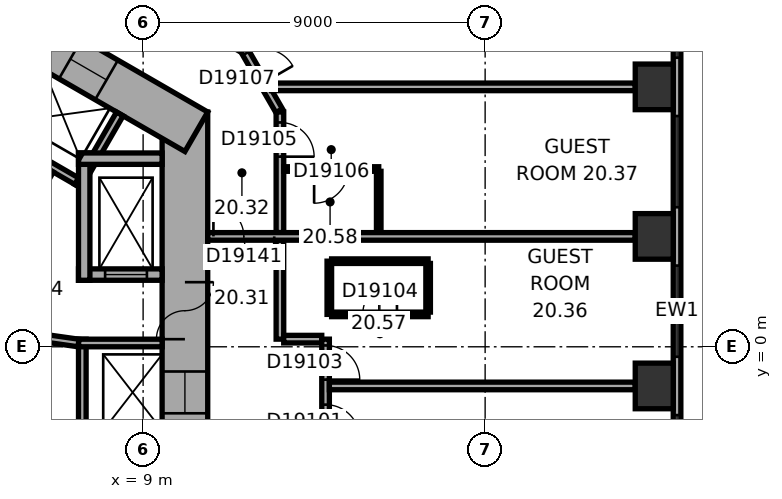
"""IFC4 building model, lengths in metres.
Left out: names, types, materials, properties, quantities, classifications, styles, units other than length and angle.
Written with IfcOpenShell. Run it as: python <this file> out.ifc"""

import sys

from ifc_helpers import new_model, si_unit, direction, frame, frame_2d, origin, origin_2d, place, context, subcontext, project, spatial, rectangle, extrude, element, fill, save


model = new_model("IFC4")
c1 = context("Model", 3, precision=1e-05, world=origin(), true_north=direction((0.0, 1.0)))
c2 = subcontext(c1, "Body", "Model", "MODEL_VIEW")
j1 = project(units=[si_unit("LENGTHUNIT", "METRE"), si_unit("PLANEANGLEUNIT", "RADIAN")], contexts=[c1])
p1 = place(None, origin())
s1 = spatial("IfcSite", under=j1, at=p1, CompositionType="ELEMENT")
p2 = place(p1, origin())
s2 = spatial("IfcBuilding", under=s1, at=p2, CompositionType="ELEMENT")
p3 = place(p2, frame((0.0, 0.0, 90.2)))
s3 = spatial("IfcBuildingStorey", under=s2, at=p3, CompositionType="ELEMENT", Elevation=90.2)
for number, where, z_axis, x_axis in (
    (1, (22.45, -1.03, 0.0), (0.0, 0.0, 1.0), (0.0, 1.0, 0.0)),
    (2, (22.45, 2.905, 0.0), (0.0, 0.0, 1.0), (0.0, 1.0, 0.0)),
    (3, (22.45, 6.839, 0.0), (0.0, 0.0, 1.0), (0.0, 1.0, 0.0)),
):
    element("IfcColumn", number, at=place(p3, frame(where, z_axis=z_axis, x_axis=x_axis)), inside=s3, PredefinedType="COLUMN", context=c2, shape_type="SweptSolid", body=[
        extrude(rectangle(XDim=1.2, YDim=1.0, at=origin_2d()), origin(), (0.0, 0.0, 1.0), 3.3),
    ])
p4 = place(p3, frame((10.1, -6.177, 0.0), z_axis=(0.0, 0.0, 1.0), x_axis=(0.0, 1.0, 0.0)))
e4 = element("IfcWall", 4, at=p4, inside=s3, PredefinedType="SHEAR", context=c2, shape_type="SweptSolid", body=[
    extrude(rectangle(XDim=12.355, YDim=1.2, at=frame_2d((6.177, 0.0))), origin(), (0.0, 0.0, 1.0), 3.3),
])
p5 = place(p4, frame((6.378, 0.0, 0.0)))
e5 = element("IfcOpeningElement", 5, at=p5, cuts=e4, PredefinedType="OPENING", context=c2, shape_type="SweptSolid", body=[
    extrude(rectangle(XDim=1.5, YDim=2.1, at=frame_2d((0.75, 1.05))), frame((0.0, 0.61, 0.0), z_axis=(0.0, -1.0, 0.0), x_axis=(1.0, 0.0, 0.0)), (0.0, 0.0, 1.0), 1.22),
])
p6 = place(p4, frame((1.828, 0.0, 0.0)))
e6 = element("IfcOpeningElement", 6, at=p6, cuts=e4, PredefinedType="OPENING", context=c2, shape_type="SweptSolid", body=[
    extrude(rectangle(XDim=1.1, YDim=2.1, at=frame_2d((0.55, 1.05))), frame((0.0, 0.61, 0.0), z_axis=(0.0, -1.0, 0.0), x_axis=(1.0, 0.0, 0.0)), (0.0, 0.0, 1.0), 1.22),
])
p7 = place(p4, frame((4.427, 0.0, 0.0)))
e7 = element("IfcOpeningElement", 7, at=p7, cuts=e4, PredefinedType="OPENING", context=c2, shape_type="SweptSolid", body=[
    extrude(rectangle(XDim=1.1, YDim=2.1, at=frame_2d((0.55, 1.05))), frame((0.0, 0.61, 0.0), z_axis=(0.0, -1.0, 0.0), x_axis=(1.0, 0.0, 0.0)), (0.0, 0.0, 1.0), 1.22),
])
p8 = place(p3, frame((10.4, 5.658, 0.0), z_axis=(0.0, 0.0, 1.0), x_axis=(-0.866021384402, 0.500006961711, 0.0)))
e8 = element("IfcWall", 8, at=p8, inside=s3, PredefinedType="SHEAR", context=c2, shape_type="SweptSolid", body=[
    extrude(rectangle(XDim=12.355, YDim=1.2, at=frame_2d((6.178, 0.0))), origin(), (0.0, 0.0, 1.0), 3.3),
])
p9 = place(p8, frame((2.728, 0.0, 0.0)))
e9 = element("IfcOpeningElement", 9, at=p9, cuts=e8, PredefinedType="OPENING", context=c2, shape_type="SweptSolid", body=[
    extrude(rectangle(XDim=1.1, YDim=2.1, at=frame_2d((0.55, 1.05))), frame((0.0, 0.61, 0.0), z_axis=(0.0, -1.0, 0.0), x_axis=(1.0, 0.0, 0.0)), (0.0, 0.0, 1.0), 1.22),
])
p10 = place(p8, frame((5.328, 0.0, 0.0)))
e10 = element("IfcOpeningElement", 10, at=p10, cuts=e8, PredefinedType="OPENING", context=c2, shape_type="SweptSolid", body=[
    extrude(rectangle(XDim=1.1, YDim=2.1, at=frame_2d((0.55, 1.05))), frame((0.0, 0.61, 0.0), z_axis=(0.0, -1.0, 0.0), x_axis=(1.0, 0.0, 0.0)), (0.0, 0.0, 1.0), 1.22),
])
p11 = place(p8, frame((7.928, 0.0, 0.0)))
e11 = element("IfcOpeningElement", 11, at=p11, cuts=e8, PredefinedType="OPENING", context=c2, shape_type="SweptSolid", body=[
    extrude(rectangle(XDim=1.1, YDim=2.1, at=frame_2d((0.55, 1.05))), frame((0.0, 0.61, 0.0), z_axis=(0.0, -1.0, 0.0), x_axis=(1.0, 0.0, 0.0)), (0.0, 0.0, 1.0), 1.22),
])
p12 = place(p3, frame((23.05, -9.687, 0.0), z_axis=(0.0, 0.0, 1.0), x_axis=(0.0, 1.0, 0.0)))
e12 = element("IfcWall", 12, at=p12, inside=s3, PredefinedType="STANDARD", context=c2, shape_type="SweptSolid", body=[
    extrude(rectangle(XDim=21.246, YDim=0.2, at=frame_2d((10.623, 0.0))), origin(), (0.0, 0.0, 1.0), 3.3),
])
p13 = place(p12, frame((1.555, 0.0, 0.8)))
e13 = element("IfcOpeningElement", 13, at=p13, cuts=e12, PredefinedType="OPENING", context=c2, shape_type="SweptSolid", body=[
    extrude(rectangle(XDim=2.4, YDim=1.7, at=frame_2d((1.2, 0.85))), frame((0.0, 0.11, 0.0), z_axis=(0.0, -1.0, 0.0), x_axis=(1.0, 0.0, 0.0)), (0.0, 0.0, 1.0), 0.22),
])
p14 = place(p12, frame((5.489, 0.0, 0.8)))
e14 = element("IfcOpeningElement", 14, at=p14, cuts=e12, PredefinedType="OPENING", context=c2, shape_type="SweptSolid", body=[
    extrude(rectangle(XDim=2.4, YDim=1.7, at=frame_2d((1.2, 0.85))), frame((0.0, 0.11, 0.0), z_axis=(0.0, -1.0, 0.0), x_axis=(1.0, 0.0, 0.0)), (0.0, 0.0, 1.0), 0.22),
])
p15 = place(p12, frame((9.424, 0.0, 0.8)))
e15 = element("IfcOpeningElement", 15, at=p15, cuts=e12, PredefinedType="OPENING", context=c2, shape_type="SweptSolid", body=[
    extrude(rectangle(XDim=2.4, YDim=1.7, at=frame_2d((1.2, 0.85))), frame((0.0, 0.11, 0.0), z_axis=(0.0, -1.0, 0.0), x_axis=(1.0, 0.0, 0.0)), (0.0, 0.0, 1.0), 0.22),
])
p16 = place(p12, frame((13.358, 0.0, 0.8)))
e16 = element("IfcOpeningElement", 16, at=p16, cuts=e12, PredefinedType="OPENING", context=c2, shape_type="SweptSolid", body=[
    extrude(rectangle(XDim=2.4, YDim=1.7, at=frame_2d((1.2, 0.85))), frame((0.0, 0.11, 0.0), z_axis=(0.0, -1.0, 0.0), x_axis=(1.0, 0.0, 0.0)), (0.0, 0.0, 1.0), 0.22),
])
p17 = place(p12, frame((17.293, 0.0, 0.8)))
e17 = element("IfcOpeningElement", 17, at=p17, cuts=e12, PredefinedType="OPENING", context=c2, shape_type="SweptSolid", body=[
    extrude(rectangle(XDim=2.4, YDim=1.7, at=frame_2d((1.2, 0.85))), frame((0.0, 0.11, 0.0), z_axis=(0.0, -1.0, 0.0), x_axis=(1.0, 0.0, 0.0)), (0.0, 0.0, 1.0), 0.22),
])
p18 = place(p3, frame((7.4, -5.2, 0.0), z_axis=(0.0, 0.0, 1.0), x_axis=(0.0, 1.0, 0.0)))
e18 = element("IfcWall", 18, at=p18, inside=s3, PredefinedType="PARTITIONING", context=c2, shape_type="SweptSolid", body=[
    extrude(rectangle(XDim=5.4, YDim=0.2, at=frame_2d((2.7, 0.0))), origin(), (0.0, 0.0, 1.0), 3.05),
])
p19 = place(p3, frame((7.3, 0.1, 0.0), z_axis=(0.0, 0.0, 1.0), x_axis=(1.0, 0.0, 0.0)))
e19 = element("IfcWall", 19, at=p19, inside=s3, PredefinedType="PARTITIONING", context=c2, shape_type="SweptSolid", body=[
    extrude(rectangle(XDim=2.2, YDim=0.2, at=frame_2d((1.1, 0.0))), origin(), (0.0, 0.0, 1.0), 3.05),
])
p20 = place(p3, frame((7.424, 4.259, 0.0), z_axis=(0.0, 0.0, 1.0), x_axis=(-0.866026010844, 0.49999894854, 0.0)))
e20 = element("IfcWall", 20, at=p20, inside=s3, PredefinedType="PARTITIONING", context=c2, shape_type="SweptSolid", body=[
    extrude(rectangle(XDim=8.0, YDim=0.2, at=frame_2d((4.0, 0.0))), origin(), (0.0, 0.0, 1.0), 3.05),
])
p21 = place(p3, frame((7.287, 4.222, 0.0), z_axis=(0.0, 0.0, 1.0), x_axis=(0.499946605688, 0.86605622881, 0.0)))
e21 = element("IfcWall", 21, at=p21, inside=s3, PredefinedType="PARTITIONING", context=c2, shape_type="SweptSolid", body=[
    extrude(rectangle(XDim=2.2, YDim=0.2, at=frame_2d((1.1, 0.0))), origin(), (0.0, 0.0, 1.0), 3.05),
])
p22 = place(p3, frame((4.158, 0.602, 0.0), z_axis=(0.0, 0.0, 1.0), x_axis=(0.499977259774, 0.866038532462, 0.0)))
e22 = element("IfcWall", 22, at=p22, inside=s3, PredefinedType="SHEAR", context=c2, shape_type="SweptSolid", body=[
    extrude(rectangle(XDim=4.7, YDim=0.3, at=frame_2d((2.35, 0.0))), origin(), (0.0, 0.0, 1.0), 3.05),
])
p23 = place(p22, frame((0.8, 0.0, 0.0)))
e23 = element("IfcOpeningElement", 23, at=p23, cuts=e22, PredefinedType="OPENING", context=c2, shape_type="SweptSolid", body=[
    extrude(rectangle(XDim=1.2, YDim=2.1, at=frame_2d((0.6, 1.05))), frame((0.0, 0.16, 0.0), z_axis=(0.0, -1.0, 0.0), x_axis=(1.0, 0.0, 0.0)), (0.0, 0.0, 1.0), 0.32),
])
p24 = place(p3, frame((4.816, -0.222, 0.0), z_axis=(0.0, 0.0, 1.0), x_axis=(0.499977259774, -0.866038532462, 0.0)))
e24 = element("IfcWall", 24, at=p24, inside=s3, PredefinedType="SHEAR", context=c2, shape_type="SweptSolid", body=[
    extrude(rectangle(XDim=4.7, YDim=0.3, at=frame_2d((2.35, 0.0))), origin(), (0.0, 0.0, 1.0), 3.05),
])
p25 = place(p3, frame((7.3, 1.9, 0.0), z_axis=(0.0, 0.0, 1.0), x_axis=(1.0, 0.0, 0.0)))
e25 = element("IfcWall", 25, at=p25, inside=s3, PredefinedType="SHEAR", context=c2, shape_type="SweptSolid", body=[
    extrude(rectangle(XDim=2.2, YDim=0.3, at=frame_2d((1.1, 0.0))), origin(), (0.0, 0.0, 1.0), 3.05),
])
p26 = place(p25, frame((0.7, 0.0, 0.0)))
e26 = element("IfcOpeningElement", 26, at=p26, cuts=e25, PredefinedType="OPENING", context=c2, shape_type="SweptSolid", body=[
    extrude(rectangle(XDim=1.1, YDim=2.1, at=frame_2d((0.55, 1.05))), frame((0.0, 0.16, 0.0), z_axis=(0.0, -1.0, 0.0), x_axis=(1.0, 0.0, 0.0)), (0.0, 0.0, 1.0), 0.32),
])
p27 = place(p3, frame((7.45, 1.75, 0.0), z_axis=(0.0, 0.0, 1.0), x_axis=(0.0, 1.0, 0.0)))
e27 = element("IfcWall", 27, at=p27, inside=s3, PredefinedType="SHEAR", context=c2, shape_type="SweptSolid", body=[
    extrude(rectangle(XDim=3.35, YDim=0.3, at=frame_2d((1.675, 0.0))), origin(), (0.0, 0.0, 1.0), 3.05),
])
p28 = place(p3, frame((7.3, 4.95, 0.0), z_axis=(0.0, 0.0, 1.0), x_axis=(1.0, 0.0, 0.0)))
e28 = element("IfcWall", 28, at=p28, inside=s3, PredefinedType="SHEAR", context=c2, shape_type="SweptSolid", body=[
    extrude(rectangle(XDim=2.2, YDim=0.3, at=frame_2d((1.1, 0.0))), origin(), (0.0, 0.0, 1.0), 3.05),
])
p29 = place(p3, frame((4.327, 0.521, 0.0), z_axis=(0.0, 0.0, 1.0), x_axis=(0.990124376366, -0.14019172346, 0.0)))
e29 = element("IfcWall", 29, at=p29, inside=s3, PredefinedType="PARTITIONING", context=c2, shape_type="SweptSolid", body=[
    extrude(rectangle(XDim=3.002, YDim=0.2, at=frame_2d((1.501, 0.0))), origin(), (0.0, 0.0, 1.0), 3.05),
])
p30 = place(p29, frame((1.15, 0.0, 0.0)))
e30 = element("IfcOpeningElement", 30, at=p30, cuts=e29, PredefinedType="OPENING", context=c2, shape_type="SweptSolid", body=[
    extrude(rectangle(XDim=0.9, YDim=2.1, at=frame_2d((0.45, 1.05))), frame((0.0, 0.11, 0.0), z_axis=(0.0, -1.0, 0.0), x_axis=(1.0, 0.0, 0.0)), (0.0, 0.0, 1.0), 0.22),
])
p31 = place(p3, frame((12.58, 6.212, 0.0), z_axis=(0.0, 0.0, 1.0), x_axis=(-0.500063286585, 0.865988862174, 0.0)))
e31 = element("IfcWall", 31, at=p31, inside=s3, PredefinedType="PARTITIONING", context=c2, shape_type="SweptSolid", body=[
    extrude(rectangle(XDim=1.86, YDim=0.2, at=frame_2d((0.93, 0.0))), origin(), (0.0, 0.0, 1.0), 3.05),
])
p32 = place(p31, frame((0.842, 0.0, 0.0)))
e32 = element("IfcOpeningElement", 32, at=p32, cuts=e31, PredefinedType="OPENING", context=c2, shape_type="SweptSolid", body=[
    extrude(rectangle(XDim=0.9, YDim=2.1, at=frame_2d((0.45, 1.05))), frame((0.0, 0.11, 0.0), z_axis=(0.0, -1.0, 0.0), x_axis=(1.0, 0.0, 0.0)), (0.0, 0.0, 1.0), 0.22),
])
p33 = place(p3, frame((12.6, 0.201, 0.0), z_axis=(0.0, 0.0, 1.0), x_axis=(0.0, 1.0, 0.0)))
e33 = element("IfcWall", 33, at=p33, inside=s3, PredefinedType="PARTITIONING", context=c2, shape_type="SweptSolid", body=[
    extrude(rectangle(XDim=2.604, YDim=0.2, at=frame_2d((1.302, 0.0))), origin(), (0.0, 0.0, 1.0), 3.05),
])
p34 = place(p3, frame((12.6, 3.004, 0.0), z_axis=(0.0, 0.0, 1.0), x_axis=(0.0, 1.0, 0.0)))
e34 = element("IfcWall", 34, at=p34, inside=s3, PredefinedType="PARTITIONING", context=c2, shape_type="SweptSolid", body=[
    extrude(rectangle(XDim=3.173, YDim=0.2, at=frame_2d((1.586, 0.0))), origin(), (0.0, 0.0, 1.0), 3.05),
])
p35 = place(p34, frame((1.998, 0.0, 0.0)))
e35 = element("IfcOpeningElement", 35, at=p35, cuts=e34, PredefinedType="OPENING", context=c2, shape_type="SweptSolid", body=[
    extrude(rectangle(XDim=0.9, YDim=2.1, at=frame_2d((0.45, 1.05))), frame((0.0, 0.11, 0.0), z_axis=(0.0, -1.0, 0.0), x_axis=(1.0, 0.0, 0.0)), (0.0, 0.0, 1.0), 0.22),
])
p36 = place(p3, frame((12.7, 4.677, 0.0), z_axis=(0.0, 0.0, 1.0), x_axis=(1.0, 0.0, 0.0)))
e36 = element("IfcWall", 36, at=p36, inside=s3, PredefinedType="PARTITIONING", context=c2, shape_type="SweptSolid", body=[
    extrude(rectangle(XDim=2.5, YDim=0.12, at=frame_2d((1.25, 0.0))), origin(), (0.0, 0.0, 1.0), 3.05),
])
p37 = place(p36, frame((0.8, 0.0, 0.0)))
e37 = element("IfcOpeningElement", 37, at=p37, cuts=e36, PredefinedType="OPENING", context=c2, shape_type="SweptSolid", body=[
    extrude(rectangle(XDim=0.9, YDim=2.1, at=frame_2d((0.45, 1.05))), frame((0.0, 0.07, 0.0), z_axis=(0.0, -1.0, 0.0), x_axis=(1.0, 0.0, 0.0)), (0.0, 0.0, 1.0), 0.14),
])
p38 = place(p3, frame((13.701, 0.201, 0.0), z_axis=(0.0, 0.0, 1.0), x_axis=(-1.0, 0.0, 0.0)))
e38 = element("IfcWall", 38, at=p38, inside=s3, PredefinedType="PARTITIONING", context=c2, shape_type="SweptSolid", body=[
    extrude(rectangle(XDim=1.001, YDim=0.2, at=frame_2d((0.5, 0.0))), origin(), (0.0, 0.0, 1.0), 3.05),
])
p39 = place(p3, frame((13.801, -5.501, 0.0), z_axis=(0.0, 0.0, 1.0), x_axis=(0.0, 1.0, 0.0)))
e39 = element("IfcWall", 39, at=p39, inside=s3, PredefinedType="PARTITIONING", context=c2, shape_type="SweptSolid", body=[
    extrude(rectangle(XDim=5.702, YDim=0.2, at=frame_2d((2.851, 0.0))), origin(), (0.0, 0.0, 1.0), 3.05),
])
p40 = place(p39, frame((3.079, 0.0, 0.0)))
e40 = element("IfcOpeningElement", 40, at=p40, cuts=e39, PredefinedType="OPENING", context=c2, shape_type="SweptSolid", body=[
    extrude(rectangle(XDim=0.9, YDim=2.1, at=frame_2d((0.45, 1.05))), frame((0.0, 0.11, 0.0), z_axis=(0.0, -1.0, 0.0), x_axis=(1.0, 0.0, 0.0)), (0.0, 0.0, 1.0), 0.22),
])
p41 = place(p39, frame((4.636, 0.0, 0.0)))
e41 = element("IfcOpeningElement", 41, at=p41, cuts=e39, PredefinedType="OPENING", context=c2, shape_type="SweptSolid", body=[
    extrude(rectangle(XDim=0.9, YDim=2.1, at=frame_2d((0.45, 1.05))), frame((0.0, 0.11, 0.0), z_axis=(0.0, -1.0, 0.0), x_axis=(1.0, 0.0, 0.0)), (0.0, 0.0, 1.0), 0.22),
])
p42 = place(p3, frame((13.9, 0.853, 0.0), z_axis=(0.0, 0.0, 1.0), x_axis=(0.0, 1.0, 0.0)))
e42 = element("IfcWall", 42, at=p42, inside=s3, PredefinedType="PARTITIONING", context=c2, shape_type="SweptSolid", body=[
    extrude(rectangle(XDim=1.4, YDim=0.12, at=frame_2d((0.7, 0.0))), origin(), (0.0, 0.0, 1.0), 3.05),
])
p43 = place(p3, frame((13.96, 2.253, 0.0), z_axis=(0.0, 0.0, 1.0), x_axis=(1.0, 0.0, 0.0)))
e43 = element("IfcWall", 43, at=p43, inside=s3, PredefinedType="PARTITIONING", context=c2, shape_type="SweptSolid", body=[
    extrude(rectangle(XDim=2.54, YDim=0.12, at=frame_2d((1.27, 0.0))), origin(), (0.0, 0.0, 1.0), 3.05),
])
p44 = place(p3, frame((15.2, 4.618, 0.0), z_axis=(0.0, 0.0, 1.0), x_axis=(0.0, -1.0, 0.0)))
e44 = element("IfcWall", 44, at=p44, inside=s3, PredefinedType="PARTITIONING", context=c2, shape_type="SweptSolid", body=[
    extrude(rectangle(XDim=1.613, YDim=0.12, at=frame_2d((0.807, 0.0))), origin(), (0.0, 0.0, 1.0), 3.05),
])
p45 = place(p3, frame((16.5, 0.853, 0.0), z_axis=(0.0, 0.0, 1.0), x_axis=(-1.0, 0.0, 0.0)))
e45 = element("IfcWall", 45, at=p45, inside=s3, PredefinedType="PARTITIONING", context=c2, shape_type="SweptSolid", body=[
    extrude(rectangle(XDim=2.54, YDim=0.12, at=frame_2d((1.27, 0.0))), origin(), (0.0, 0.0, 1.0), 3.05),
])
p46 = place(p45, frame((0.82, 0.0, 0.0)))
e46 = element("IfcOpeningElement", 46, at=p46, cuts=e45, PredefinedType="OPENING", context=c2, shape_type="SweptSolid", body=[
    extrude(rectangle(XDim=0.9, YDim=2.1, at=frame_2d((0.45, 1.05))), frame((0.0, 0.07, 0.0), z_axis=(0.0, -1.0, 0.0), x_axis=(1.0, 0.0, 0.0)), (0.0, 0.0, 1.0), 0.14),
])
p47 = place(p3, frame((16.5, 2.193, 0.0), z_axis=(0.0, 0.0, 1.0), x_axis=(0.0, -1.0, 0.0)))
e47 = element("IfcWall", 47, at=p47, inside=s3, PredefinedType="PARTITIONING", context=c2, shape_type="SweptSolid", body=[
    extrude(rectangle(XDim=1.28, YDim=0.12, at=frame_2d((0.64, 0.0))), origin(), (0.0, 0.0, 1.0), 3.05),
])
p48 = place(p3, frame((21.95, -1.03, 0.0), z_axis=(0.0, 0.0, 1.0), x_axis=(-1.0, 0.0, 0.0)))
e48 = element("IfcWall", 48, at=p48, inside=s3, PredefinedType="PARTITIONING", context=c2, shape_type="SweptSolid", body=[
    extrude(rectangle(XDim=8.049, YDim=0.2, at=frame_2d((4.024, 0.0))), origin(), (0.0, 0.0, 1.0), 2.6),
])
p49 = place(p3, frame((21.95, 2.905, 0.0), z_axis=(0.0, 0.0, 1.0), x_axis=(-1.0, 0.0, 0.0)))
e49 = element("IfcWall", 49, at=p49, inside=s3, PredefinedType="PARTITIONING", context=c2, shape_type="SweptSolid", body=[
    extrude(rectangle(XDim=11.25, YDim=0.2, at=frame_2d((5.625, 0.0))), origin(), (0.0, 0.0, 1.0), 3.05),
])
p50 = place(p49, frame((9.5, 0.0, 0.0)))
e50 = element("IfcOpeningElement", 50, at=p50, cuts=e49, PredefinedType="OPENING", context=c2, shape_type="SweptSolid", body=[
    extrude(rectangle(XDim=1.6, YDim=2.1, at=frame_2d((0.8, 1.05))), frame((0.0, 0.11, 0.0), z_axis=(0.0, -1.0, 0.0), x_axis=(1.0, 0.0, 0.0)), (0.0, 0.0, 1.0), 0.22),
])
p51 = place(p3, frame((21.95, 6.839, 0.0), z_axis=(0.0, 0.0, 1.0), x_axis=(-1.0, 0.0, 0.0)))
e51 = element("IfcWall", 51, at=p51, inside=s3, PredefinedType="PARTITIONING", context=c2, shape_type="SweptSolid", body=[
    extrude(rectangle(XDim=9.572, YDim=0.2, at=frame_2d((4.786, 0.0))), origin(), (0.0, 0.0, 1.0), 3.05),
])
p52 = place(p14, origin())
e52 = element("IfcWindow", 52, at=p52, inside=s3, PartitioningType="SINGLE_PANEL", PredefinedType="WINDOW", context=c2, shape_type="SweptSolid", body=[
    extrude(rectangle(XDim=2.4, YDim=1.7, at=frame_2d((1.2, 0.85))), frame((0.0, 0.03, 0.0), z_axis=(0.0, -1.0, 0.0), x_axis=(1.0, 0.0, 0.0)), (0.0, 0.0, 1.0), 0.06),
])
fill(e14, e52)
p53 = place(p15, origin())
e53 = element("IfcWindow", 53, at=p53, inside=s3, PartitioningType="SINGLE_PANEL", PredefinedType="WINDOW", context=c2, shape_type="SweptSolid", body=[
    extrude(rectangle(XDim=2.4, YDim=1.7, at=frame_2d((1.2, 0.85))), frame((0.0, 0.03, 0.0), z_axis=(0.0, -1.0, 0.0), x_axis=(1.0, 0.0, 0.0)), (0.0, 0.0, 1.0), 0.06),
])
fill(e15, e53)
p54 = place(p16, origin())
e54 = element("IfcWindow", 54, at=p54, inside=s3, PartitioningType="SINGLE_PANEL", PredefinedType="WINDOW", context=c2, shape_type="SweptSolid", body=[
    extrude(rectangle(XDim=2.4, YDim=1.7, at=frame_2d((1.2, 0.85))), frame((0.0, 0.03, 0.0), z_axis=(0.0, -1.0, 0.0), x_axis=(1.0, 0.0, 0.0)), (0.0, 0.0, 1.0), 0.06),
])
fill(e16, e54)
p55 = place(p17, origin())
e55 = element("IfcWindow", 55, at=p55, inside=s3, PartitioningType="SINGLE_PANEL", PredefinedType="WINDOW", context=c2, shape_type="SweptSolid", body=[
    extrude(rectangle(XDim=2.4, YDim=1.7, at=frame_2d((1.2, 0.85))), frame((0.0, 0.03, 0.0), z_axis=(0.0, -1.0, 0.0), x_axis=(1.0, 0.0, 0.0)), (0.0, 0.0, 1.0), 0.06),
])
fill(e17, e55)
p56 = place(p5, origin())
e56 = element("IfcDoor", 56, at=p56, inside=s3, OperationType="DOUBLE_DOOR_SINGLE_SWING", PredefinedType="DOOR", context=c2, shape_type="SweptSolid", body=[
    extrude(rectangle(XDim=1.5, YDim=2.1, at=frame_2d((0.75, 1.05))), frame((0.0, 0.025, 0.0), z_axis=(0.0, -1.0, 0.0), x_axis=(1.0, 0.0, 0.0)), (0.0, 0.0, 1.0), 0.05),
])
fill(e5, e56)
p57 = place(p26, origin())
e57 = element("IfcDoor", 57, at=p57, inside=s3, OperationType="DOUBLE_DOOR_SLIDING", PredefinedType="DOOR", context=c2, shape_type="SweptSolid", body=[
    extrude(rectangle(XDim=1.1, YDim=2.1, at=frame_2d((0.55, 1.05))), frame((0.0, 0.025, 0.0), z_axis=(0.0, -1.0, 0.0), x_axis=(1.0, 0.0, 0.0)), (0.0, 0.0, 1.0), 0.05),
])
fill(e26, e57)
p58 = place(p7, origin())
e58 = element("IfcDoor", 58, at=p58, inside=s3, OperationType="DOUBLE_DOOR_SLIDING", PredefinedType="DOOR", context=c2, shape_type="SweptSolid", body=[
    extrude(rectangle(XDim=1.1, YDim=2.1, at=frame_2d((0.55, 1.05))), frame((0.0, 0.025, 0.0), z_axis=(0.0, -1.0, 0.0), x_axis=(1.0, 0.0, 0.0)), (0.0, 0.0, 1.0), 0.05),
])
fill(e7, e58)
p59 = place(p9, origin())
e59 = element("IfcDoor", 59, at=p59, inside=s3, OperationType="DOUBLE_DOOR_SLIDING", PredefinedType="DOOR", context=c2, shape_type="SweptSolid", body=[
    extrude(rectangle(XDim=1.1, YDim=2.1, at=frame_2d((0.55, 1.05))), frame((0.0, 0.025, 0.0), z_axis=(0.0, -1.0, 0.0), x_axis=(1.0, 0.0, 0.0)), (0.0, 0.0, 1.0), 0.05),
])
fill(e9, e59)
p60 = place(p40, origin())
e60 = element("IfcDoor", 60, at=p60, inside=s3, OperationType="SINGLE_SWING_LEFT", PredefinedType="DOOR", context=c2, shape_type="SweptSolid", body=[
    extrude(rectangle(XDim=0.9, YDim=2.1, at=frame_2d((0.45, 1.05))), frame((0.0, 0.025, 0.0), z_axis=(0.0, -1.0, 0.0), x_axis=(1.0, 0.0, 0.0)), (0.0, 0.0, 1.0), 0.05),
])
fill(e40, e60)
p61 = place(p41, origin())
e61 = element("IfcDoor", 61, at=p61, inside=s3, OperationType="SINGLE_SWING_LEFT", PredefinedType="DOOR", context=c2, shape_type="SweptSolid", body=[
    extrude(rectangle(XDim=0.9, YDim=2.1, at=frame_2d((0.45, 1.05))), frame((0.0, 0.025, 0.0), z_axis=(0.0, -1.0, 0.0), x_axis=(1.0, 0.0, 0.0)), (0.0, 0.0, 1.0), 0.05),
])
fill(e41, e61)
p62 = place(p46, origin())
e62 = element("IfcDoor", 62, at=p62, inside=s3, OperationType="SINGLE_SWING_LEFT", PredefinedType="DOOR", context=c2, shape_type="SweptSolid", body=[
    extrude(rectangle(XDim=0.9, YDim=2.1, at=frame_2d((0.45, 1.05))), frame((0.0, 0.025, 0.0), z_axis=(0.0, -1.0, 0.0), x_axis=(1.0, 0.0, 0.0)), (0.0, 0.0, 1.0), 0.05),
])
fill(e46, e62)
p63 = place(p35, origin())
e63 = element("IfcDoor", 63, at=p63, inside=s3, OperationType="SINGLE_SWING_LEFT", PredefinedType="DOOR", context=c2, shape_type="SweptSolid", body=[
    extrude(rectangle(XDim=0.9, YDim=2.1, at=frame_2d((0.45, 1.05))), frame((0.0, 0.025, 0.0), z_axis=(0.0, -1.0, 0.0), x_axis=(1.0, 0.0, 0.0)), (0.0, 0.0, 1.0), 0.05),
])
fill(e35, e63)
p64 = place(p37, origin())
e64 = element("IfcDoor", 64, at=p64, inside=s3, OperationType="SINGLE_SWING_LEFT", PredefinedType="DOOR", context=c2, shape_type="SweptSolid", body=[
    extrude(rectangle(XDim=0.9, YDim=2.1, at=frame_2d((0.45, 1.05))), frame((0.0, 0.025, 0.0), z_axis=(0.0, -1.0, 0.0), x_axis=(1.0, 0.0, 0.0)), (0.0, 0.0, 1.0), 0.05),
])
fill(e37, e64)
p65 = place(p32, origin())
e65 = element("IfcDoor", 65, at=p65, inside=s3, OperationType="SINGLE_SWING_LEFT", PredefinedType="DOOR", context=c2, shape_type="SweptSolid", body=[
    extrude(rectangle(XDim=0.9, YDim=2.1, at=frame_2d((0.45, 1.05))), frame((0.0, 0.025, 0.0), z_axis=(0.0, -1.0, 0.0), x_axis=(1.0, 0.0, 0.0)), (0.0, 0.0, 1.0), 0.05),
])
fill(e32, e65)
p66 = place(p50, origin())
e66 = element("IfcDoor", 66, at=p66, inside=s3, OperationType="DOUBLE_DOOR_SINGLE_SWING", PredefinedType="DOOR", context=c2, shape_type="SweptSolid", body=[
    extrude(rectangle(XDim=1.6, YDim=2.1, at=frame_2d((0.8, 1.05))), frame((0.0, 0.025, 0.0), z_axis=(0.0, -1.0, 0.0), x_axis=(1.0, 0.0, 0.0)), (0.0, 0.0, 1.0), 0.05),
])
fill(e50, e66)
save(model, sys.argv[1])
